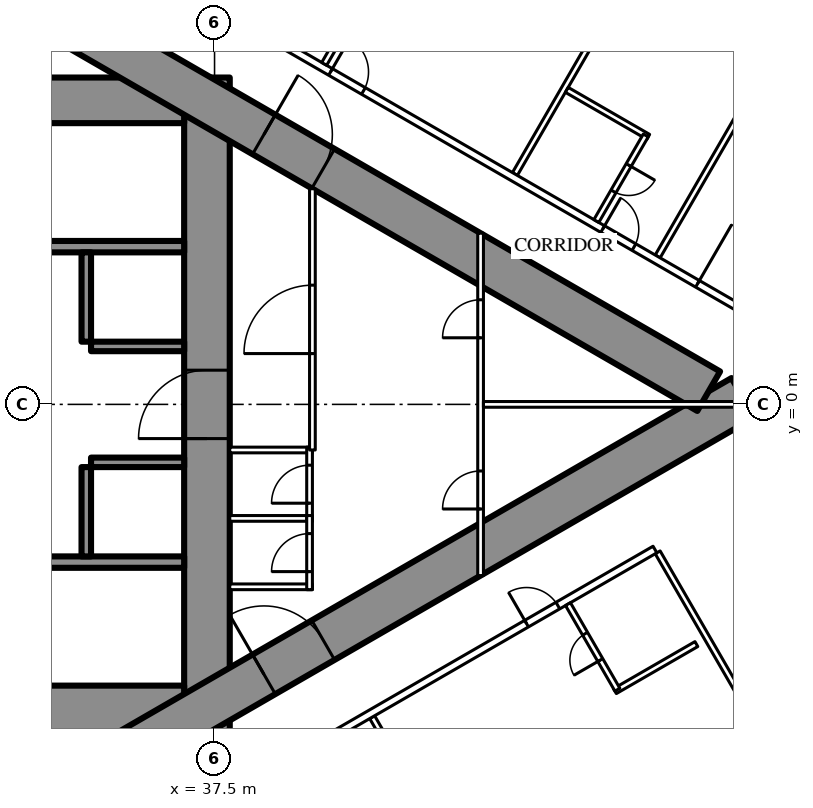
"""IFC4 building model, lengths in metres.
Left out: names, types, materials, properties, quantities, classifications, styles, units other than length and angle.
Written with IfcOpenShell. Run it as: python <this file> out.ifc"""

import sys

from ifc_helpers import new_model, si_unit, direction, frame, frame_2d, origin, place, context, subcontext, project, spatial, rectangle, extrude, element, fill, save


model = new_model("IFC4")
c1 = context("Model", 3, precision=1e-05, world=origin(), true_north=direction((0.0, 1.0)))
c2 = subcontext(c1, "Body", "Model", "MODEL_VIEW")
j1 = project(units=[si_unit("LENGTHUNIT", "METRE"), si_unit("PLANEANGLEUNIT", "RADIAN")], contexts=[c1])
p1 = place(None, origin())
s1 = spatial("IfcSite", under=j1, at=p1, CompositionType="ELEMENT")
p2 = place(p1, origin())
s2 = spatial("IfcBuilding", under=s1, at=p2, CompositionType="ELEMENT")
p3 = place(p2, frame((0.0, 0.0, 74.0)))
s3 = spatial("IfcBuildingStorey", under=s2, at=p3, CompositionType="ELEMENT", Elevation=74.0)
p4 = place(p3, frame((37.3, -8.6, 0.0), z_axis=(0.0, 0.0, 1.0), x_axis=(0.0, 1.0, 0.0)))
e1 = element("IfcWall", 1, at=p4, inside=s3, PredefinedType="SHEAR", context=c2, shape_type="SweptSolid", body=[
    extrude(rectangle(XDim=17.2, YDim=1.2, at=frame_2d((8.6, 0.0))), origin(), (0.0, 0.0, 1.0), 3.5),
])
p5 = place(p4, frame((7.7, 0.0, 0.0)))
e2 = element("IfcOpeningElement", 2, at=p5, cuts=e1, PredefinedType="OPENING", context=c2, shape_type="SweptSolid", body=[
    extrude(rectangle(XDim=1.8, YDim=2.2, at=frame_2d((0.9, 1.1))), frame((0.0, 0.61, 0.0), z_axis=(0.0, -1.0, 0.0), x_axis=(1.0, 0.0, 0.0)), (0.0, 0.0, 1.0), 1.22),
])
p6 = place(p3, frame((28.3, -8.0, 0.0), z_axis=(0.0, 0.0, 1.0), x_axis=(1.0, 0.0, 0.0)))
e3 = element("IfcWall", 3, at=p6, inside=s3, PredefinedType="SHEAR", context=c2, shape_type="SweptSolid", body=[
    extrude(rectangle(XDim=8.4, YDim=1.2, at=frame_2d((4.2, 0.0))), origin(), (0.0, 0.0, 1.0), 3.5),
])
p7 = place(p6, frame((0.25, 0.0, 0.0)))
e4 = element("IfcOpeningElement", 4, at=p7, cuts=e3, PredefinedType="OPENING", context=c2, shape_type="SweptSolid", body=[
    extrude(rectangle(XDim=1.0, YDim=2.2, at=frame_2d((0.5, 1.1))), frame((0.0, 0.61, 0.0), z_axis=(0.0, -1.0, 0.0), x_axis=(1.0, 0.0, 0.0)), (0.0, 0.0, 1.0), 1.22),
])
p8 = place(p3, frame((28.3, 8.0, 0.0), z_axis=(0.0, 0.0, 1.0), x_axis=(1.0, 0.0, 0.0)))
e5 = element("IfcWall", 5, at=p8, inside=s3, PredefinedType="SHEAR", context=c2, shape_type="SweptSolid", body=[
    extrude(rectangle(XDim=8.4, YDim=1.2, at=frame_2d((4.2, 0.0))), origin(), (0.0, 0.0, 1.0), 3.5),
])
p9 = place(p8, frame((0.25, 0.0, 0.0)))
e6 = element("IfcOpeningElement", 6, at=p9, cuts=e5, PredefinedType="OPENING", context=c2, shape_type="SweptSolid", body=[
    extrude(rectangle(XDim=1.0, YDim=2.2, at=frame_2d((0.5, 1.1))), frame((0.0, 0.61, 0.0), z_axis=(0.0, -1.0, 0.0), x_axis=(1.0, 0.0, 0.0)), (0.0, 0.0, 1.0), 1.22),
])
for number, where, z_axis, x_axis in (
    (7, (28.3, -4.15, 0.0), (0.0, 0.0, 1.0), (1.0, 0.0, 0.0)),
    (8, (28.3, 4.15, 0.0), (0.0, 0.0, 1.0), (1.0, 0.0, 0.0)),
):
    element("IfcWall", number, at=place(p3, frame(where, z_axis=z_axis, x_axis=x_axis)), inside=s3, PredefinedType="SHEAR", context=c2, shape_type="SweptSolid", body=[
        extrude(rectangle(XDim=8.4, YDim=0.3, at=frame_2d((4.2, 0.0))), origin(), (0.0, 0.0, 1.0), 3.5),
    ])
p10 = place(p3, frame((34.125, -4.0, 0.0), z_axis=(0.0, 0.0, 1.0), x_axis=(0.0, 1.0, 0.0)))
e9 = element("IfcWall", 9, at=p10, inside=s3, PredefinedType="SHEAR", context=c2, shape_type="SweptSolid", body=[
    extrude(rectangle(XDim=2.35, YDim=0.25, at=frame_2d((1.175, 0.0))), origin(), (0.0, 0.0, 1.0), 3.5),
])
p11 = place(p3, frame((34.25, -1.525, 0.0), z_axis=(0.0, 0.0, 1.0), x_axis=(1.0, 0.0, 0.0)))
e10 = element("IfcWall", 10, at=p11, inside=s3, PredefinedType="SHEAR", context=c2, shape_type="SweptSolid", body=[
    extrude(rectangle(XDim=2.45, YDim=0.25, at=frame_2d((1.225, 0.0))), origin(), (0.0, 0.0, 1.0), 3.5),
])
p12 = place(p3, frame((34.125, 1.65, 0.0), z_axis=(0.0, 0.0, 1.0), x_axis=(0.0, 1.0, 0.0)))
e11 = element("IfcWall", 11, at=p12, inside=s3, PredefinedType="SHEAR", context=c2, shape_type="SweptSolid", body=[
    extrude(rectangle(XDim=2.35, YDim=0.25, at=frame_2d((1.175, 0.0))), origin(), (0.0, 0.0, 1.0), 3.5),
])
p13 = place(p3, frame((34.25, 1.525, 0.0), z_axis=(0.0, 0.0, 1.0), x_axis=(1.0, 0.0, 0.0)))
e12 = element("IfcWall", 12, at=p13, inside=s3, PredefinedType="SHEAR", context=c2, shape_type="SweptSolid", body=[
    extrude(rectangle(XDim=2.45, YDim=0.25, at=frame_2d((1.225, 0.0))), origin(), (0.0, 0.0, 1.0), 3.5),
])
p14 = place(p3, frame((27.2, -13.8, 0.0), z_axis=(0.0, 0.0, 1.0), x_axis=(0.866027159892, 0.499996958321, 0.0)))
e13 = element("IfcWall", 13, at=p14, inside=s3, PredefinedType="SHEAR", context=c2, shape_type="SweptSolid", body=[
    extrude(rectangle(XDim=27.947, YDim=1.2, at=frame_2d((13.973, 0.0))), origin(), (0.0, 0.0, 1.0), 3.5),
])
p15 = place(p14, frame((4.6, 0.0, 0.0)))
e14 = element("IfcOpeningElement", 14, at=p15, cuts=e13, PredefinedType="OPENING", context=c2, shape_type="SweptSolid", body=[
    extrude(rectangle(XDim=1.0, YDim=2.2, at=frame_2d((0.5, 1.1))), frame((0.0, 0.61, 0.0), z_axis=(0.0, -1.0, 0.0), x_axis=(1.0, 0.0, 0.0)), (0.0, 0.0, 1.0), 1.22),
])
p16 = place(p14, frame((13.395, 0.0, 0.0)))
e15 = element("IfcOpeningElement", 15, at=p16, cuts=e13, PredefinedType="OPENING", context=c2, shape_type="SweptSolid", body=[
    extrude(rectangle(XDim=1.8, YDim=2.2, at=frame_2d((0.9, 1.1))), frame((0.0, 0.61, 0.0), z_axis=(0.0, -1.0, 0.0), x_axis=(1.0, 0.0, 0.0)), (0.0, 0.0, 1.0), 1.22),
])
p17 = place(p3, frame((27.2, 13.8, 0.0), z_axis=(0.0, 0.0, 1.0), x_axis=(0.866024515034, -0.500001539357, 0.0)))
e16 = element("IfcWall", 16, at=p17, inside=s3, PredefinedType="SHEAR", context=c2, shape_type="SweptSolid", body=[
    extrude(rectangle(XDim=26.907, YDim=1.2, at=frame_2d((13.454, 0.0))), origin(), (0.0, 0.0, 1.0), 3.5),
])
p18 = place(p17, frame((4.6, 0.0, 0.0)))
e17 = element("IfcOpeningElement", 17, at=p18, cuts=e16, PredefinedType="OPENING", context=c2, shape_type="SweptSolid", body=[
    extrude(rectangle(XDim=1.0, YDim=2.2, at=frame_2d((0.5, 1.1))), frame((0.0, 0.61, 0.0), z_axis=(0.0, -1.0, 0.0), x_axis=(1.0, 0.0, 0.0)), (0.0, 0.0, 1.0), 1.22),
])
p19 = place(p17, frame((13.395, 0.0, 0.0)))
e18 = element("IfcOpeningElement", 18, at=p19, cuts=e16, PredefinedType="OPENING", context=c2, shape_type="SweptSolid", body=[
    extrude(rectangle(XDim=1.8, YDim=2.2, at=frame_2d((0.9, 1.1))), frame((0.0, 0.61, 0.0), z_axis=(0.0, -1.0, 0.0), x_axis=(1.0, 0.0, 0.0)), (0.0, 0.0, 1.0), 1.22),
])
p20 = place(p3, frame((41.647, -8.23, 0.0), z_axis=(0.0, 0.0, 1.0), x_axis=(0.49998590462, -0.866033541603, 0.0)))
e19 = element("IfcWall", 19, at=p20, inside=s3, PredefinedType="PARTITIONING", context=c2, shape_type="SweptSolid", body=[
    extrude(rectangle(XDim=12.621, YDim=0.15, at=frame_2d((6.311, 0.0))), origin(), (0.0, 0.0, 1.0), 3.25),
])
p21 = place(p3, frame((49.159, -3.893, 0.0), z_axis=(0.0, 0.0, 1.0), x_axis=(0.499998773722, -0.866026111775, 0.0)))
e20 = element("IfcWall", 20, at=p21, inside=s3, PredefinedType="PARTITIONING", context=c2, shape_type="SweptSolid", body=[
    extrude(rectangle(XDim=9.892, YDim=0.15, at=frame_2d((4.946, 0.0))), origin(), (0.0, 0.0, 1.0), 2.25),
])
p22 = place(p3, frame((45.403, 6.062, 0.0), z_axis=(0.0, 0.0, 1.0), x_axis=(0.500013434677, 0.866017647131, 0.0)))
e21 = element("IfcWall", 21, at=p22, inside=s3, PredefinedType="PARTITIONING", context=c2, shape_type="SweptSolid", body=[
    extrude(rectangle(XDim=9.902, YDim=0.15, at=frame_2d((4.951, 0.0))), origin(), (0.0, 0.0, 1.0), 2.25),
])
p23 = place(p3, frame((49.159, 3.893, 0.0), z_axis=(0.0, 0.0, 1.0), x_axis=(0.499995664361, 0.866027906952, 0.0)))
e22 = element("IfcWall", 22, at=p23, inside=s3, PredefinedType="PARTITIONING", context=c2, shape_type="SweptSolid", body=[
    extrude(rectangle(XDim=12.711, YDim=0.15, at=frame_2d((6.356, 0.0))), origin(), (0.0, 0.0, 1.0), 3.25),
])
p24 = place(p3, frame((36.834, 10.894, 0.0), z_axis=(0.0, 0.0, 1.0), x_axis=(0.866028157229, -0.499995230863, 0.0)))
e23 = element("IfcWall", 23, at=p24, inside=s3, PredefinedType="PARTITIONING", context=c2, shape_type="SweptSolid", body=[
    extrude(rectangle(XDim=21.667, YDim=0.2, at=frame_2d((10.833, 0.0))), origin(), (0.0, 0.0, 1.0), 3.25),
])
p25 = place(p24, frame((18.885, 0.0, 0.0)))
e24 = element("IfcOpeningElement", 24, at=p25, cuts=e23, PredefinedType="OPENING", context=c2, shape_type="SweptSolid", body=[
    extrude(rectangle(XDim=0.95, YDim=2.2, at=frame_2d((0.475, 1.1))), frame((0.0, 0.11, 0.0), z_axis=(0.0, -1.0, 0.0), x_axis=(1.0, 0.0, 0.0)), (0.0, 0.0, 1.0), 0.22),
])
p26 = place(p24, frame((15.443, 0.0, 0.0)))
e25 = element("IfcOpeningElement", 25, at=p26, cuts=e23, PredefinedType="OPENING", context=c2, shape_type="SweptSolid", body=[
    extrude(rectangle(XDim=1.8, YDim=2.2, at=frame_2d((0.9, 1.1))), frame((0.0, 0.11, 0.0), z_axis=(0.0, -1.0, 0.0), x_axis=(1.0, 0.0, 0.0)), (0.0, 0.0, 1.0), 0.22),
])
p27 = place(p24, frame((12.562, 0.0, 0.0)))
e26 = element("IfcOpeningElement", 26, at=p27, cuts=e23, PredefinedType="OPENING", context=c2, shape_type="SweptSolid", body=[
    extrude(rectangle(XDim=0.95, YDim=2.2, at=frame_2d((0.475, 1.1))), frame((0.0, 0.11, 0.0), z_axis=(0.0, -1.0, 0.0), x_axis=(1.0, 0.0, 0.0)), (0.0, 0.0, 1.0), 0.22),
])
p28 = place(p24, frame((4.292, 0.0, 0.0)))
e27 = element("IfcOpeningElement", 27, at=p28, cuts=e23, PredefinedType="OPENING", context=c2, shape_type="SweptSolid", body=[
    extrude(rectangle(XDim=1.0, YDim=2.2, at=frame_2d((0.5, 1.1))), frame((0.0, 0.11, 0.0), z_axis=(0.0, -1.0, 0.0), x_axis=(1.0, 0.0, 0.0)), (0.0, 0.0, 1.0), 0.22),
])
p29 = place(p3, frame((37.96, -10.243, 0.0), z_axis=(0.0, 0.0, 1.0), x_axis=(0.866030548046, 0.499991089772, 0.0)))
e28 = element("IfcWall", 28, at=p29, inside=s3, PredefinedType="PARTITIONING", context=c2, shape_type="SweptSolid", body=[
    extrude(rectangle(XDim=12.849, YDim=0.2, at=frame_2d((6.425, 0.0))), origin(), (0.0, 0.0, 1.0), 3.25),
])
p30 = place(p29, frame((8.949, 0.0, 0.0)))
e29 = element("IfcOpeningElement", 29, at=p30, cuts=e28, PredefinedType="OPENING", context=c2, shape_type="SweptSolid", body=[
    extrude(rectangle(XDim=0.95, YDim=2.2, at=frame_2d((0.475, 1.1))), frame((0.0, 0.11, 0.0), z_axis=(0.0, -1.0, 0.0), x_axis=(1.0, 0.0, 0.0)), (0.0, 0.0, 1.0), 0.22),
])
p31 = place(p29, frame((0.6, 0.0, 0.0)))
e30 = element("IfcOpeningElement", 30, at=p31, cuts=e28, PredefinedType="OPENING", context=c2, shape_type="SweptSolid", body=[
    extrude(rectangle(XDim=0.95, YDim=2.2, at=frame_2d((0.475, 1.1))), frame((0.0, 0.11, 0.0), z_axis=(0.0, -1.0, 0.0), x_axis=(1.0, 0.0, 0.0)), (0.0, 0.0, 1.0), 0.22),
])
p32 = place(p3, frame((48.035, -7.545, 0.0), z_axis=(0.0, 0.0, 1.0), x_axis=(0.866006523861, 0.500032699561, 0.0)))
e31 = element("IfcWall", 31, at=p32, inside=s3, PredefinedType="PARTITIONING", context=c2, shape_type="SweptSolid", body=[
    extrude(rectangle(XDim=2.475, YDim=0.15, at=frame_2d((1.237, 0.0))), origin(), (0.0, 0.0, 1.0), 3.25),
])
p33 = place(p3, frame((46.8, -5.255, 0.0), z_axis=(0.0, 0.0, 1.0), x_axis=(0.500006934395, -0.866021400173, 0.0)))
e32 = element("IfcWall", 32, at=p33, inside=s3, PredefinedType="PARTITIONING", context=c2, shape_type="SweptSolid", body=[
    extrude(rectangle(XDim=2.6, YDim=0.15, at=frame_2d((1.3, 0.0))), origin(), (0.0, 0.0, 1.0), 3.25),
])
p34 = place(p33, frame((0.9, 0.0, 0.0)))
e33 = element("IfcOpeningElement", 33, at=p34, cuts=e32, PredefinedType="OPENING", context=c2, shape_type="SweptSolid", body=[
    extrude(rectangle(XDim=0.8, YDim=2.2, at=frame_2d((0.4, 1.1))), frame((0.0, 0.085, 0.0), z_axis=(0.0, -1.0, 0.0), x_axis=(1.0, 0.0, 0.0)), (0.0, 0.0, 1.0), 0.17),
])
p35 = place(p3, frame((46.768, 8.276, 0.0), z_axis=(0.0, 0.0, 1.0), x_axis=(0.866031185235, -0.4999899861, 0.0)))
e34 = element("IfcWall", 34, at=p35, inside=s3, PredefinedType="PARTITIONING", context=c2, shape_type="SweptSolid", body=[
    extrude(rectangle(XDim=2.475, YDim=0.15, at=frame_2d((1.238, 0.0))), origin(), (0.0, 0.0, 1.0), 3.25),
])
p36 = place(p3, frame((47.546, 4.824, 0.0), z_axis=(0.0, 0.0, 1.0), x_axis=(0.500006934395, 0.866021400173, 0.0)))
e35 = element("IfcWall", 35, at=p36, inside=s3, PredefinedType="PARTITIONING", context=c2, shape_type="SweptSolid", body=[
    extrude(rectangle(XDim=2.6, YDim=0.15, at=frame_2d((1.3, 0.0))), origin(), (0.0, 0.0, 1.0), 3.25),
])
p37 = place(p36, frame((0.9, 0.0, 0.0)))
e36 = element("IfcOpeningElement", 36, at=p37, cuts=e35, PredefinedType="OPENING", context=c2, shape_type="SweptSolid", body=[
    extrude(rectangle(XDim=0.8, YDim=2.2, at=frame_2d((0.4, 1.1))), frame((0.0, 0.085, 0.0), z_axis=(0.0, -1.0, 0.0), x_axis=(1.0, 0.0, 0.0)), (0.0, 0.0, 1.0), 0.17),
])
p38 = place(p3, frame((40.385, 8.959, 0.0), z_axis=(0.0, 0.0, 1.0), x_axis=(0.49998411664, 0.866034573852, 0.0)))
e37 = element("IfcWall", 37, at=p38, inside=s3, PredefinedType="PARTITIONING", context=c2, shape_type="SweptSolid", body=[
    extrude(rectangle(XDim=2.8, YDim=0.15, at=frame_2d((1.4, 0.0))), origin(), (0.0, 0.0, 1.0), 3.25),
])
p39 = place(p38, frame((1.55, 0.0, 0.0)))
e38 = element("IfcOpeningElement", 38, at=p39, cuts=e37, PredefinedType="OPENING", context=c2, shape_type="SweptSolid", body=[
    extrude(rectangle(XDim=1.0, YDim=2.2, at=frame_2d((0.5, 1.1))), frame((0.0, 0.085, 0.0), z_axis=(0.0, -1.0, 0.0), x_axis=(1.0, 0.0, 0.0)), (0.0, 0.0, 1.0), 0.17),
])
for number, where, z_axis, x_axis in (
    (39, (37.9, -1.2, 0.0), (0.0, 0.0, 1.0), (1.0, 0.0, 0.0)),
    (40, (37.9, -3.0, 0.0), (0.0, 0.0, 1.0), (1.0, 0.0, 0.0)),
    (41, (37.9, -4.8, 0.0), (0.0, 0.0, 1.0), (1.0, 0.0, 0.0)),
):
    element("IfcWall", number, at=place(p3, frame(where, z_axis=z_axis, x_axis=x_axis)), inside=s3, PredefinedType="PARTITIONING", context=c2, shape_type="SweptSolid", body=[
        extrude(rectangle(XDim=2.175, YDim=0.15, at=frame_2d((1.087, 0.0))), origin(), (0.0, 0.0, 1.0), 3.25),
    ])
p40 = place(p3, frame((40.0, -3.075, 0.0), z_axis=(0.0, 0.0, 1.0), x_axis=(0.0, 1.0, 0.0)))
e42 = element("IfcWall", 42, at=p40, inside=s3, PredefinedType="PARTITIONING", context=c2, shape_type="SweptSolid", body=[
    extrude(rectangle(XDim=1.95, YDim=0.15, at=frame_2d((0.975, 0.0))), origin(), (0.0, 0.0, 1.0), 3.25),
])
p41 = place(p40, frame((0.475, 0.0, 0.0)))
e43 = element("IfcOpeningElement", 43, at=p41, cuts=e42, PredefinedType="OPENING", context=c2, shape_type="SweptSolid", body=[
    extrude(rectangle(XDim=1.0, YDim=2.2, at=frame_2d((0.5, 1.1))), frame((0.0, 0.085, 0.0), z_axis=(0.0, -1.0, 0.0), x_axis=(1.0, 0.0, 0.0)), (0.0, 0.0, 1.0), 0.17),
])
p42 = place(p3, frame((40.0, -4.875, 0.0), z_axis=(0.0, 0.0, 1.0), x_axis=(0.0, 1.0, 0.0)))
e44 = element("IfcWall", 44, at=p42, inside=s3, PredefinedType="PARTITIONING", context=c2, shape_type="SweptSolid", body=[
    extrude(rectangle(XDim=1.95, YDim=0.15, at=frame_2d((0.975, 0.0))), origin(), (0.0, 0.0, 1.0), 3.25),
])
p43 = place(p42, frame((0.475, 0.0, 0.0)))
e45 = element("IfcOpeningElement", 45, at=p43, cuts=e44, PredefinedType="OPENING", context=c2, shape_type="SweptSolid", body=[
    extrude(rectangle(XDim=1.0, YDim=2.2, at=frame_2d((0.5, 1.1))), frame((0.0, 0.085, 0.0), z_axis=(0.0, -1.0, 0.0), x_axis=(1.0, 0.0, 0.0)), (0.0, 0.0, 1.0), 0.17),
])
p44 = place(p3, frame((40.075, -1.2, 0.0), z_axis=(0.0, 0.0, 1.0), x_axis=(0.0, 1.0, 0.0)))
e46 = element("IfcWall", 46, at=p44, inside=s3, PredefinedType="PARTITIONING", context=c2, shape_type="SweptSolid", body=[
    extrude(rectangle(XDim=6.874, YDim=0.15, at=frame_2d((3.437, 0.0))), origin(), (0.0, 0.0, 1.0), 3.25),
])
p45 = place(p44, frame((2.537, 0.0, 0.0)))
e47 = element("IfcOpeningElement", 47, at=p45, cuts=e46, PredefinedType="OPENING", context=c2, shape_type="SweptSolid", body=[
    extrude(rectangle(XDim=1.8, YDim=2.2, at=frame_2d((0.9, 1.1))), frame((0.0, 0.085, 0.0), z_axis=(0.0, -1.0, 0.0), x_axis=(1.0, 0.0, 0.0)), (0.0, 0.0, 1.0), 0.17),
])
p46 = place(p3, frame((44.5, -4.505, 0.0), z_axis=(0.0, 0.0, 1.0), x_axis=(0.0, 1.0, 0.0)))
e48 = element("IfcWall", 48, at=p46, inside=s3, PredefinedType="PARTITIONING", context=c2, shape_type="SweptSolid", body=[
    extrude(rectangle(XDim=9.009, YDim=0.15, at=frame_2d((4.505, 0.0))), origin(), (0.0, 0.0, 1.0), 2.45),
])
p47 = place(p46, frame((1.752, 0.0, 0.0)))
e49 = element("IfcOpeningElement", 49, at=p47, cuts=e48, PredefinedType="OPENING", context=c2, shape_type="SweptSolid", body=[
    extrude(rectangle(XDim=1.0, YDim=2.2, at=frame_2d((0.5, 1.1))), frame((0.0, 0.085, 0.0), z_axis=(0.0, -1.0, 0.0), x_axis=(1.0, 0.0, 0.0)), (0.0, 0.0, 1.0), 0.17),
])
p48 = place(p46, frame((6.257, 0.0, 0.0)))
e50 = element("IfcOpeningElement", 50, at=p48, cuts=e48, PredefinedType="OPENING", context=c2, shape_type="SweptSolid", body=[
    extrude(rectangle(XDim=1.0, YDim=2.2, at=frame_2d((0.5, 1.1))), frame((0.0, 0.085, 0.0), z_axis=(0.0, -1.0, 0.0), x_axis=(1.0, 0.0, 0.0)), (0.0, 0.0, 1.0), 0.17),
])
p49 = place(p3, frame((44.575, 0.0, 0.0), z_axis=(0.0, 0.0, 1.0), x_axis=(1.0, 0.0, 0.0)))
e51 = element("IfcWall", 51, at=p49, inside=s3, PredefinedType="PARTITIONING", context=c2, shape_type="SweptSolid", body=[
    extrude(rectangle(XDim=7.727, YDim=0.15, at=frame_2d((3.864, 0.0))), origin(), (0.0, 0.0, 1.0), 2.25),
])
p50 = place(p34, origin())
e52 = element("IfcDoor", 52, at=p50, inside=s3, OperationType="SINGLE_SWING_RIGHT", PredefinedType="DOOR", context=c2, shape_type="SweptSolid", body=[
    extrude(rectangle(XDim=0.8, YDim=2.2, at=frame_2d((0.4, 1.1))), frame((0.0, 0.025, 0.0), z_axis=(0.0, -1.0, 0.0), x_axis=(1.0, 0.0, 0.0)), (0.0, 0.0, 1.0), 0.05),
])
fill(e33, e52)
p51 = place(p30, origin())
e53 = element("IfcDoor", 53, at=p51, inside=s3, OperationType="SINGLE_SWING_LEFT", PredefinedType="DOOR", context=c2, shape_type="SweptSolid", body=[
    extrude(rectangle(XDim=0.95, YDim=2.2, at=frame_2d((0.475, 1.1))), frame((0.0, 0.025, 0.0), z_axis=(0.0, -1.0, 0.0), x_axis=(1.0, 0.0, 0.0)), (0.0, 0.0, 1.0), 0.05),
])
fill(e29, e53)
p52 = place(p26, origin())
e54 = element("IfcDoor", 54, at=p52, inside=s3, OperationType="DOUBLE_DOOR_SINGLE_SWING", PredefinedType="DOOR", context=c2, shape_type="SweptSolid", body=[
    extrude(rectangle(XDim=1.8, YDim=2.2, at=frame_2d((0.9, 1.1))), frame((0.0, 0.025, 0.0), z_axis=(0.0, -1.0, 0.0), x_axis=(1.0, 0.0, 0.0)), (0.0, 0.0, 1.0), 0.05),
])
fill(e25, e54)
p53 = place(p37, origin())
e55 = element("IfcDoor", 55, at=p53, inside=s3, OperationType="SINGLE_SWING_RIGHT", PredefinedType="DOOR", context=c2, shape_type="SweptSolid", body=[
    extrude(rectangle(XDim=0.8, YDim=2.2, at=frame_2d((0.4, 1.1))), frame((0.0, 0.025, 0.0), z_axis=(0.0, -1.0, 0.0), x_axis=(1.0, 0.0, 0.0)), (0.0, 0.0, 1.0), 0.05),
])
fill(e36, e55)
p54 = place(p27, origin())
e56 = element("IfcDoor", 56, at=p54, inside=s3, OperationType="SINGLE_SWING_LEFT", PredefinedType="DOOR", context=c2, shape_type="SweptSolid", body=[
    extrude(rectangle(XDim=0.95, YDim=2.2, at=frame_2d((0.475, 1.1))), frame((0.0, 0.025, 0.0), z_axis=(0.0, -1.0, 0.0), x_axis=(1.0, 0.0, 0.0)), (0.0, 0.0, 1.0), 0.05),
])
fill(e26, e56)
p55 = place(p28, origin())
e57 = element("IfcDoor", 57, at=p55, inside=s3, OperationType="SINGLE_SWING_LEFT", PredefinedType="DOOR", context=c2, shape_type="SweptSolid", body=[
    extrude(rectangle(XDim=1.0, YDim=2.2, at=frame_2d((0.5, 1.1))), frame((0.0, 0.025, 0.0), z_axis=(0.0, -1.0, 0.0), x_axis=(1.0, 0.0, 0.0)), (0.0, 0.0, 1.0), 0.05),
])
fill(e27, e57)
p56 = place(p41, origin())
e58 = element("IfcDoor", 58, at=p56, inside=s3, OperationType="SINGLE_SWING_LEFT", PredefinedType="DOOR", context=c2, shape_type="SweptSolid", body=[
    extrude(rectangle(XDim=1.0, YDim=2.2, at=frame_2d((0.5, 1.1))), frame((0.0, 0.025, 0.0), z_axis=(0.0, -1.0, 0.0), x_axis=(1.0, 0.0, 0.0)), (0.0, 0.0, 1.0), 0.05),
])
fill(e43, e58)
p57 = place(p43, origin())
e59 = element("IfcDoor", 59, at=p57, inside=s3, OperationType="SINGLE_SWING_LEFT", PredefinedType="DOOR", context=c2, shape_type="SweptSolid", body=[
    extrude(rectangle(XDim=1.0, YDim=2.2, at=frame_2d((0.5, 1.1))), frame((0.0, 0.025, 0.0), z_axis=(0.0, -1.0, 0.0), x_axis=(1.0, 0.0, 0.0)), (0.0, 0.0, 1.0), 0.05),
])
fill(e45, e59)
p58 = place(p45, origin())
e60 = element("IfcDoor", 60, at=p58, inside=s3, OperationType="DOUBLE_DOOR_SINGLE_SWING", PredefinedType="DOOR", context=c2, shape_type="SweptSolid", body=[
    extrude(rectangle(XDim=1.8, YDim=2.2, at=frame_2d((0.9, 1.1))), frame((0.0, 0.025, 0.0), z_axis=(0.0, -1.0, 0.0), x_axis=(1.0, 0.0, 0.0)), (0.0, 0.0, 1.0), 0.05),
])
fill(e47, e60)
p59 = place(p47, origin())
e61 = element("IfcDoor", 61, at=p59, inside=s3, OperationType="SINGLE_SWING_LEFT", PredefinedType="DOOR", context=c2, shape_type="SweptSolid", body=[
    extrude(rectangle(XDim=1.0, YDim=2.2, at=frame_2d((0.5, 1.1))), frame((0.0, 0.025, 0.0), z_axis=(0.0, -1.0, 0.0), x_axis=(1.0, 0.0, 0.0)), (0.0, 0.0, 1.0), 0.05),
])
fill(e49, e61)
p60 = place(p48, origin())
e62 = element("IfcDoor", 62, at=p60, inside=s3, OperationType="SINGLE_SWING_LEFT", PredefinedType="DOOR", context=c2, shape_type="SweptSolid", body=[
    extrude(rectangle(XDim=1.0, YDim=2.2, at=frame_2d((0.5, 1.1))), frame((0.0, 0.025, 0.0), z_axis=(0.0, -1.0, 0.0), x_axis=(1.0, 0.0, 0.0)), (0.0, 0.0, 1.0), 0.05),
])
fill(e50, e62)
p61 = place(p16, origin())
e63 = element("IfcDoor", 63, at=p61, inside=s3, OperationType="DOUBLE_DOOR_SINGLE_SWING", PredefinedType="DOOR", context=c2, shape_type="SweptSolid", body=[
    extrude(rectangle(XDim=1.8, YDim=2.2, at=frame_2d((0.9, 1.1))), frame((0.0, 0.025, 0.0), z_axis=(0.0, -1.0, 0.0), x_axis=(1.0, 0.0, 0.0)), (0.0, 0.0, 1.0), 0.05),
])
fill(e15, e63)
p62 = place(p19, origin())
e64 = element("IfcDoor", 64, at=p62, inside=s3, OperationType="DOUBLE_DOOR_SINGLE_SWING", PredefinedType="DOOR", context=c2, shape_type="SweptSolid", body=[
    extrude(rectangle(XDim=1.8, YDim=2.2, at=frame_2d((0.9, 1.1))), frame((0.0, 0.025, 0.0), z_axis=(0.0, -1.0, 0.0), x_axis=(1.0, 0.0, 0.0)), (0.0, 0.0, 1.0), 0.05),
])
fill(e18, e64)
p63 = place(p5, origin())
e65 = element("IfcDoor", 65, at=p63, inside=s3, OperationType="DOUBLE_DOOR_SINGLE_SWING", PredefinedType="DOOR", context=c2, shape_type="SweptSolid", body=[
    extrude(rectangle(XDim=1.8, YDim=2.2, at=frame_2d((0.9, 1.1))), frame((0.0, 0.025, 0.0), z_axis=(0.0, -1.0, 0.0), x_axis=(1.0, 0.0, 0.0)), (0.0, 0.0, 1.0), 0.05),
])
fill(e2, e65)
save(model, sys.argv[1])
